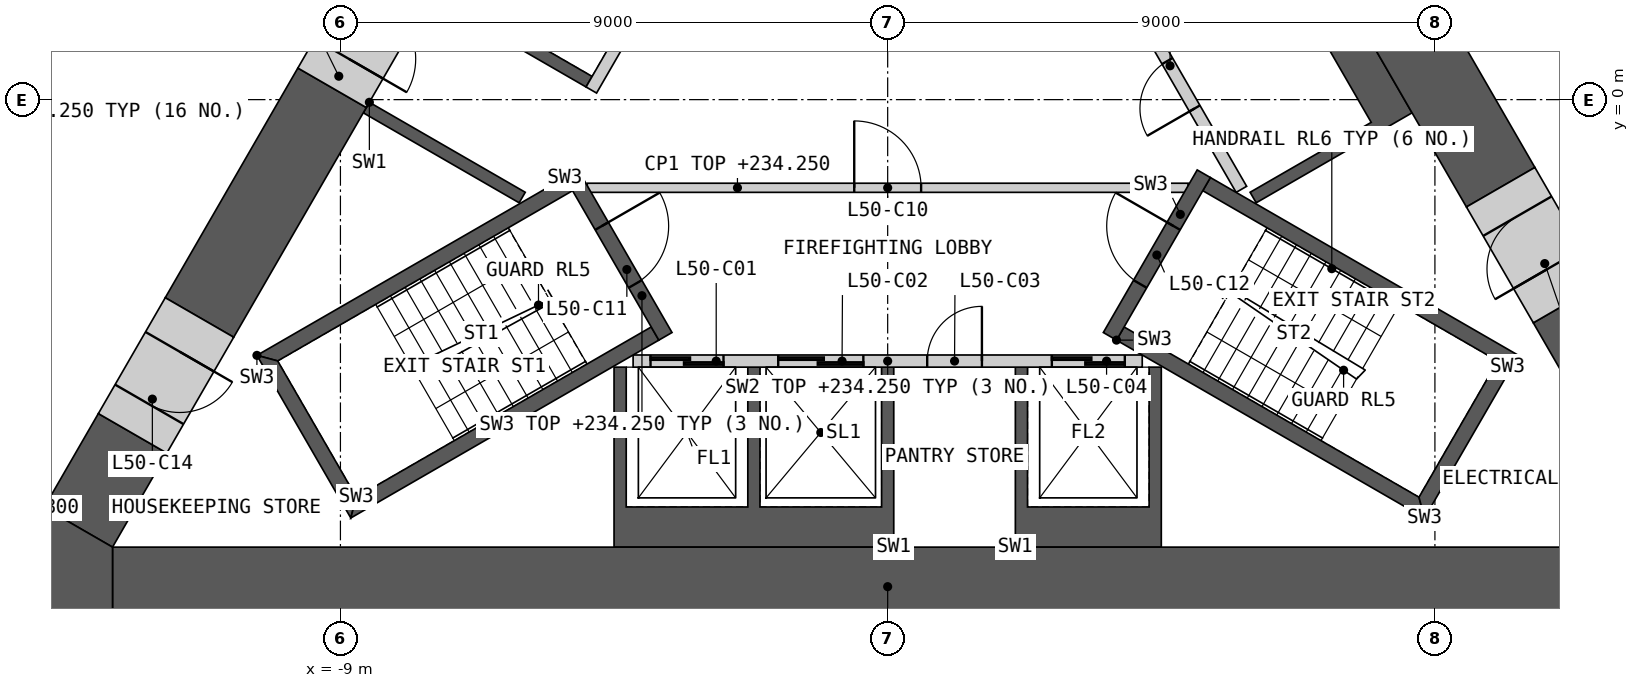
"""IFC4 building model, lengths in metres.
Left out: names, types, materials, properties, quantities, classifications, styles, units other than length and angle.
Written with IfcOpenShell. Run it as: python <this file> out.ifc"""

import sys

from ifc_helpers import new_model, si_unit, direction, frame, frame_2d, origin, place, context, subcontext, project, spatial, polyline, rectangle, outline, extrude, element, fill, save


model = new_model("IFC4")
c1 = context("Model", 3, precision=1e-05, world=origin(), true_north=direction((0.0, 1.0)))
c2 = subcontext(c1, "Body", "Model", "MODEL_VIEW")
j1 = project(units=[si_unit("LENGTHUNIT", "METRE"), si_unit("PLANEANGLEUNIT", "RADIAN")], contexts=[c1])
p1 = place(None, origin())
s1 = spatial("IfcSite", under=j1, at=p1, CompositionType="ELEMENT")
p2 = place(p1, origin())
s2 = spatial("IfcBuilding", under=s1, at=p2, CompositionType="ELEMENT")
p3 = place(p2, frame((0.0, 0.0, 231.0)))
s3 = spatial("IfcBuildingStorey", under=s2, at=p3, CompositionType="ELEMENT", Elevation=231.0)
p4 = place(p3, origin())
e1 = element("IfcWall", 1, at=p4, inside=s3, PredefinedType="SHEAR", context=c2, shape_type="SweptSolid", body=[
    extrude(outline(polyline([(0.1, -7.36), (-4.5, -7.36), (-4.5, -4.4), (-4.3, -4.4), (-4.3, -6.7), (-2.3, -6.7), (-2.3, -4.4), (-2.1, -4.4), (-2.1, -6.7), (-0.1, -6.7), (-0.1, -4.4), (0.1, -4.4), (0.1, -7.36)])), origin(), (0.0, 0.0, 1.0), 3.25),
])
p5 = place(p3, origin())
e2 = element("IfcWall", 2, at=p5, inside=s3, PredefinedType="SHEAR", context=c2, shape_type="SweptSolid", body=[
    extrude(outline(polyline([(2.1, -7.36), (2.1, -4.4), (2.3, -4.4), (2.3, -6.7), (4.3, -6.7), (4.3, -4.4), (4.5, -4.4), (4.5, -7.36), (2.1, -7.36)])), origin(), (0.0, 0.0, 1.0), 3.25),
])
p6 = place(p3, frame((-4.187, -4.3, 0.0), z_axis=(0.0, 0.0, 1.0), x_axis=(1.0, 0.0, 0.0)))
e3 = element("IfcWall", 3, at=p6, inside=s3, PredefinedType="SOLIDWALL", context=c2, shape_type="SweptSolid", body=[
    extrude(rectangle(XDim=8.373, YDim=0.2, at=frame_2d((4.187, 0.0))), origin(), (0.0, 0.0, 1.0), 3.25),
])
p7 = place(p6, frame((0.287, 0.0, 0.0)))
e4 = element("IfcOpeningElement", 4, at=p7, cuts=e3, PredefinedType="OPENING", context=c2, shape_type="SweptSolid", body=[
    extrude(rectangle(XDim=1.2, YDim=2.1, at=frame_2d((0.6, 1.05))), frame((0.0, 0.11, 0.0), z_axis=(0.0, -1.0, 0.0), x_axis=(1.0, 0.0, 0.0)), (0.0, 0.0, 1.0), 0.22),
])
p8 = place(p6, frame((2.387, 0.0, 0.0)))
e5 = element("IfcOpeningElement", 5, at=p8, cuts=e3, PredefinedType="OPENING", context=c2, shape_type="SweptSolid", body=[
    extrude(rectangle(XDim=1.4, YDim=2.1, at=frame_2d((0.7, 1.05))), frame((0.0, 0.11, 0.0), z_axis=(0.0, -1.0, 0.0), x_axis=(1.0, 0.0, 0.0)), (0.0, 0.0, 1.0), 0.22),
])
p9 = place(p6, frame((4.837, 0.0, 0.0)))
e6 = element("IfcOpeningElement", 6, at=p9, cuts=e3, PredefinedType="OPENING", context=c2, shape_type="SweptSolid", body=[
    extrude(rectangle(XDim=0.9, YDim=2.1, at=frame_2d((0.45, 1.05))), frame((0.0, 0.11, 0.0), z_axis=(0.0, -1.0, 0.0), x_axis=(1.0, 0.0, 0.0)), (0.0, 0.0, 1.0), 0.22),
])
p10 = place(p6, frame((6.887, 0.0, 0.0)))
e7 = element("IfcOpeningElement", 7, at=p10, cuts=e3, PredefinedType="OPENING", context=c2, shape_type="SweptSolid", body=[
    extrude(rectangle(XDim=1.2, YDim=2.1, at=frame_2d((0.6, 1.05))), frame((0.0, 0.11, 0.0), z_axis=(0.0, -1.0, 0.0), x_axis=(1.0, 0.0, 0.0)), (0.0, 0.0, 1.0), 0.22),
])
p11 = place(p3, origin())
e8 = element("IfcWall", 8, at=p11, inside=s3, PredefinedType="SHEAR", context=c2, shape_type="SweptSolid", body=[
    extrude(outline(polyline([(6.324, 3.767), (8.624, -0.217), (8.231, -0.444), (6.061, -1.697), (5.96, -1.524), (7.952, -0.374), (5.852, 3.263), (3.861, 2.113), (3.76, 2.287), (5.931, 3.54), (6.324, 3.767)])), origin(), (0.0, 0.0, 1.0), 3.25),
])
p12 = place(p3, frame((5.817, -1.476, 0.0), z_axis=(0.0, 0.0, 1.0), x_axis=(-0.500002616675, 0.866023893041, 0.0)))
e9 = element("IfcWall", 9, at=p12, inside=s3, PredefinedType="SOLIDWALL", context=c2, shape_type="SweptSolid", body=[
    extrude(rectangle(XDim=8.373, YDim=0.2, at=frame_2d((4.187, 0.0))), origin(), (0.0, 0.0, 1.0), 3.25),
])
p13 = place(p12, frame((1.537, 0.0, 0.0)))
e10 = element("IfcOpeningElement", 10, at=p13, cuts=e9, PredefinedType="OPENING", context=c2, shape_type="SweptSolid", body=[
    extrude(rectangle(XDim=0.9, YDim=2.1, at=frame_2d((0.45, 1.05))), frame((0.0, 0.11, 0.0), z_axis=(0.0, -1.0, 0.0), x_axis=(1.0, 0.0, 0.0)), (0.0, 0.0, 1.0), 0.22),
])
p14 = place(p12, frame((4.837, 0.0, 0.0)))
e11 = element("IfcOpeningElement", 11, at=p14, cuts=e9, PredefinedType="OPENING", context=c2, shape_type="SweptSolid", body=[
    extrude(rectangle(XDim=0.9, YDim=2.1, at=frame_2d((0.45, 1.05))), frame((0.0, 0.11, 0.0), z_axis=(0.0, -1.0, 0.0), x_axis=(1.0, 0.0, 0.0)), (0.0, 0.0, 1.0), 0.22),
])
p15 = place(p12, frame((6.937, 0.0, 0.0)))
e12 = element("IfcOpeningElement", 12, at=p15, cuts=e9, PredefinedType="OPENING", context=c2, shape_type="SweptSolid", body=[
    extrude(rectangle(XDim=1.1, YDim=2.1, at=frame_2d((0.55, 1.05))), frame((0.0, 0.11, 0.0), z_axis=(0.0, -1.0, 0.0), x_axis=(1.0, 0.0, 0.0)), (0.0, 0.0, 1.0), 0.22),
])
p16 = place(p3, origin())
e13 = element("IfcWall", 13, at=p16, inside=s3, PredefinedType="SHEAR", context=c2, shape_type="SweptSolid", body=[
    extrude(outline(polyline([(-7.524, 1.688), (-4.124, 7.577), (-3.731, 7.35), (-1.561, 6.097), (-1.66, 5.924), (-3.652, 7.074), (-4.652, 5.342), (-2.66, 4.192), (-2.76, 4.019), (-4.752, 5.169), (-5.752, 3.437), (-3.76, 2.287), (-3.861, 2.113), (-5.852, 3.263), (-6.852, 1.531), (-4.861, 0.381), (-4.96, 0.208), (-7.131, 1.461), (-7.524, 1.688)])), origin(), (0.0, 0.0, 1.0), 3.25),
])
p17 = place(p3, origin())
e14 = element("IfcWall", 14, at=p17, inside=s3, PredefinedType="SHEAR", context=c2, shape_type="SweptSolid", body=[
    extrude(outline(polyline([(-8.524, -0.044), (-8.131, -0.271), (-5.96, -1.524), (-6.061, -1.697), (-8.231, -0.444), (-8.624, -0.217), (-8.524, -0.044)])), origin(), (0.0, 0.0, 1.0), 3.25),
])
p18 = place(p3, frame((-1.631, 5.776, 0.0), z_axis=(0.0, 0.0, 1.0), x_axis=(-0.499992876559, -0.866029516466, 0.0)))
e15 = element("IfcWall", 15, at=p18, inside=s3, PredefinedType="SOLIDWALL", context=c2, shape_type="SweptSolid", body=[
    extrude(rectangle(XDim=6.486, YDim=0.2, at=frame_2d((3.243, 0.0))), origin(), (0.0, 0.0, 1.0), 3.25),
])
p19 = place(p18, frame((0.337, 0.0, 0.0)))
e16 = element("IfcOpeningElement", 16, at=p19, cuts=e15, PredefinedType="OPENING", context=c2, shape_type="SweptSolid", body=[
    extrude(rectangle(XDim=1.1, YDim=2.1, at=frame_2d((0.55, 1.05))), frame((0.0, 0.11, 0.0), z_axis=(0.0, -1.0, 0.0), x_axis=(1.0, 0.0, 0.0)), (0.0, 0.0, 1.0), 0.22),
])
p20 = place(p18, frame((2.537, 0.0, 0.0)))
e17 = element("IfcOpeningElement", 17, at=p20, cuts=e15, PredefinedType="OPENING", context=c2, shape_type="SweptSolid", body=[
    extrude(rectangle(XDim=1.1, YDim=2.1, at=frame_2d((0.55, 1.05))), frame((0.0, 0.11, 0.0), z_axis=(0.0, -1.0, 0.0), x_axis=(1.0, 0.0, 0.0)), (0.0, 0.0, 1.0), 0.22),
])
p21 = place(p3, frame((-4.941, -1.45, 0.0), z_axis=(0.0, 0.0, 1.0), x_axis=(1.0, 0.0, 0.0)))
e18 = element("IfcWall", 18, at=p21, inside=s3, PredefinedType="PARTITIONING", context=c2, shape_type="SweptSolid", body=[
    extrude(rectangle(XDim=9.882, YDim=0.15, at=frame_2d((4.941, 0.0))), origin(), (0.0, 0.0, 1.0), 3.25),
])
p22 = place(p21, frame((4.391, 0.0, 0.0)))
e19 = element("IfcOpeningElement", 19, at=p22, cuts=e18, PredefinedType="OPENING", context=c2, shape_type="SweptSolid", body=[
    extrude(rectangle(XDim=1.1, YDim=2.1, at=frame_2d((0.55, 1.05))), frame((0.0, 0.085, 0.0), z_axis=(0.0, -1.0, 0.0), x_axis=(1.0, 0.0, 0.0)), (0.0, 0.0, 1.0), 0.17),
])
p23 = place(p3, origin())
e20 = element("IfcWall", 20, at=p23, inside=s3, PredefinedType="SHEAR", context=c2, shape_type="SweptSolid", body=[
    extrude(outline(polyline([(-5.307, -1.281), (-10.374, -4.206), (-10.032, -4.298), (-5.182, -1.498), (-5.307, -1.281)])), origin(), (0.0, 0.0, 1.0), 3.25),
])
p24 = place(p3, origin())
e21 = element("IfcWall", 21, at=p24, inside=s3, PredefinedType="SHEAR", context=c2, shape_type="SweptSolid", body=[
    extrude(outline(polyline([(-10.374, -4.206), (-8.83, -6.881), (-8.738, -6.539), (-10.032, -4.298), (-10.374, -4.206)])), origin(), (0.0, 0.0, 1.0), 3.25),
])
p25 = place(p3, origin())
e22 = element("IfcWall", 22, at=p25, inside=s3, PredefinedType="SHEAR", context=c2, shape_type="SweptSolid", body=[
    extrude(outline(polyline([(-8.738, -6.539), (-8.83, -6.881), (-3.763, -3.956), (-3.888, -3.739), (-8.738, -6.539)])), origin(), (0.0, 0.0, 1.0), 3.25),
])
p26 = place(p3, frame((-5.199, -1.219, 0.0), z_axis=(0.0, 0.0, 1.0), x_axis=(0.499982516597, -0.866035497597, 0.0)))
e23 = element("IfcWall", 23, at=p26, inside=s3, PredefinedType="SHEAR", context=c2, shape_type="SweptSolid", body=[
    extrude(rectangle(XDim=3.088, YDim=0.25, at=frame_2d((1.544, 0.0))), origin(), (0.0, 0.0, 1.0), 3.25),
])
p27 = place(p26, frame((0.994, 0.0, 0.0)))
e24 = element("IfcOpeningElement", 24, at=p27, cuts=e23, PredefinedType="OPENING", context=c2, shape_type="SweptSolid", body=[
    extrude(rectangle(XDim=1.1, YDim=2.1, at=frame_2d((0.55, 1.05))), frame((0.0, 0.135, 0.0), z_axis=(0.0, -1.0, 0.0), x_axis=(1.0, 0.0, 0.0)), (0.0, 0.0, 1.0), 0.27),
])
p28 = place(p3, origin())
e25 = element("IfcWall", 25, at=p28, inside=s3, PredefinedType="SHEAR", context=c2, shape_type="SweptSolid", body=[
    extrude(outline(polyline([(3.763, -3.956), (8.83, -6.881), (8.738, -6.539), (3.888, -3.739), (3.763, -3.956)])), origin(), (0.0, 0.0, 1.0), 3.25),
])
p29 = place(p3, origin())
e26 = element("IfcWall", 26, at=p29, inside=s3, PredefinedType="SHEAR", context=c2, shape_type="SweptSolid", body=[
    extrude(outline(polyline([(8.83, -6.881), (10.374, -4.206), (10.032, -4.298), (8.738, -6.539), (8.83, -6.881)])), origin(), (0.0, 0.0, 1.0), 3.25),
])
p30 = place(p3, origin())
e27 = element("IfcWall", 27, at=p30, inside=s3, PredefinedType="SHEAR", context=c2, shape_type="SweptSolid", body=[
    extrude(outline(polyline([(10.032, -4.298), (10.374, -4.206), (5.307, -1.281), (5.182, -1.498), (10.032, -4.298)])), origin(), (0.0, 0.0, 1.0), 3.25),
])
p31 = place(p3, frame((3.655, -3.893, 0.0), z_axis=(0.0, 0.0, 1.0), x_axis=(0.499982516597, 0.866035497597, 0.0)))
e28 = element("IfcWall", 28, at=p31, inside=s3, PredefinedType="SHEAR", context=c2, shape_type="SweptSolid", body=[
    extrude(rectangle(XDim=3.088, YDim=0.25, at=frame_2d((1.544, 0.0))), origin(), (0.0, 0.0, 1.0), 3.25),
])
p32 = place(p31, frame((0.994, 0.0, 0.0)))
e29 = element("IfcOpeningElement", 29, at=p32, cuts=e28, PredefinedType="OPENING", context=c2, shape_type="SweptSolid", body=[
    extrude(rectangle(XDim=1.1, YDim=2.1, at=frame_2d((0.55, 1.05))), frame((0.0, 0.135, 0.0), z_axis=(0.0, -1.0, 0.0), x_axis=(1.0, 0.0, 0.0)), (0.0, 0.0, 1.0), 0.27),
])
p33 = place(p3, frame((-12.748, -8.01, 0.0), z_axis=(0.0, 0.0, 1.0), x_axis=(1.0, 0.0, 0.0)))
e30 = element("IfcWall", 30, at=p33, inside=s3, PredefinedType="SHEAR", context=c2, shape_type="SweptSolid", body=[
    extrude(rectangle(XDim=25.497, YDim=1.3, at=frame_2d((12.748, 0.0))), origin(), (0.0, 0.0, 1.0), 3.25),
])
p34 = place(p3, frame((10.081, -1.441, 0.0), z_axis=(0.0, 0.0, 1.0), x_axis=(-0.500012180433, 0.866018371294, 0.0)))
e31 = element("IfcWall", 31, at=p34, inside=s3, PredefinedType="SHEAR", context=c2, shape_type="SweptSolid", body=[
    extrude(rectangle(XDim=15.05, YDim=1.3, at=frame_2d((7.525, 0.0))), origin(), (0.0, 0.0, 1.0), 3.25),
])
p35 = place(p3, frame((13.311, -7.035, 0.0), z_axis=(0.0, 0.0, 1.0), x_axis=(-0.500003555838, 0.866023350811, 0.0)))
e32 = element("IfcWall", 32, at=p35, inside=s3, PredefinedType="SHEAR", context=c2, shape_type="SweptSolid", body=[
    extrude(rectangle(XDim=4.26, YDim=1.3, at=frame_2d((2.13, 0.0))), origin(), (0.0, 0.0, 1.0), 3.25),
])
p36 = place(p3, frame((-9.137, 0.195, 0.0), z_axis=(0.0, 0.0, 1.0), x_axis=(-0.499985697398, -0.866033661238, 0.0)))
e33 = element("IfcWall", 33, at=p36, inside=s3, PredefinedType="SHEAR", context=c2, shape_type="SweptSolid", body=[
    extrude(rectangle(XDim=4.362, YDim=1.3, at=frame_2d((2.181, 0.0))), origin(), (0.0, 0.0, 1.0), 3.25),
])
p37 = place(p3, frame((-12.418, -5.488, 0.0), z_axis=(0.0, 0.0, 1.0), x_axis=(-0.499931460552, -0.866064971437, 0.0)))
e34 = element("IfcWall", 34, at=p37, inside=s3, PredefinedType="SHEAR", context=c2, shape_type="SweptSolid", body=[
    extrude(rectangle(XDim=1.786, YDim=1.3, at=frame_2d((0.893, 0.0))), origin(), (0.0, 0.0, 1.0), 3.25),
])
p38 = place(p3, origin())
e35 = element("IfcWall", 35, at=p38, inside=s3, PredefinedType="SHEAR", context=c2, shape_type="SweptSolid", body=[
    extrude(outline(polyline([(-13.874, -6.71), (-12.748, -7.36), (-12.748, -8.66), (-15.0, -8.66), (-13.874, -6.71)])), origin(), (0.0, 0.0, 1.0), 3.25),
])
p39 = place(p3, frame((-11.318, -3.583, 0.0), z_axis=(0.0, 0.0, 1.0), x_axis=(-0.50002983664, -0.866008176907, 0.0)))
e36 = element("IfcWall", 36, at=p39, inside=s3, PredefinedType="SHEAR", context=c2, shape_type="SweptSolid", body=[
    extrude(rectangle(XDim=2.2, YDim=1.3, at=frame_2d((1.1, 0.0))), origin(), (0.0, 0.0, 1.0), 3.25),
])
p40 = place(p39, frame((0.65, 0.0, 0.0)))
e37 = element("IfcOpeningElement", 37, at=p40, cuts=e36, PredefinedType="OPENING", context=c2, shape_type="SweptSolid", body=[
    extrude(rectangle(XDim=1.0, YDim=2.1, at=frame_2d((0.5, 1.05))), frame((0.0, 0.66, 0.0), z_axis=(0.0, -1.0, 0.0), x_axis=(1.0, 0.0, 0.0)), (0.0, 0.0, 1.0), 1.32),
])
p41 = place(p3, frame((11.181, -3.346, 0.0), z_axis=(0.0, 0.0, 1.0), x_axis=(-0.499946605688, 0.86605622881, 0.0)))
e38 = element("IfcWall", 38, at=p41, inside=s3, PredefinedType="SHEAR", context=c2, shape_type="SweptSolid", body=[
    extrude(rectangle(XDim=2.2, YDim=1.3, at=frame_2d((1.1, 0.0))), origin(), (0.0, 0.0, 1.0), 3.25),
])
p42 = place(p41, frame((0.65, 0.0, 0.0)))
e39 = element("IfcOpeningElement", 39, at=p42, cuts=e38, PredefinedType="OPENING", context=c2, shape_type="SweptSolid", body=[
    extrude(rectangle(XDim=1.0, YDim=2.1, at=frame_2d((0.5, 1.05))), frame((0.0, 0.66, 0.0), z_axis=(0.0, -1.0, 0.0), x_axis=(1.0, 0.0, 0.0)), (0.0, 0.0, 1.0), 1.32),
])
p43 = place(p3, frame((-8.037, 2.1, 0.0), z_axis=(0.0, 0.0, 1.0), x_axis=(-0.50002983664, -0.866008176907, 0.0)))
e40 = element("IfcWall", 40, at=p43, inside=s3, PredefinedType="SHEAR", context=c2, shape_type="SweptSolid", body=[
    extrude(rectangle(XDim=2.2, YDim=1.3, at=frame_2d((1.1, 0.0))), origin(), (0.0, 0.0, 1.0), 3.25),
])
p44 = place(p43, frame((0.55, 0.0, 0.0)))
e41 = element("IfcOpeningElement", 41, at=p44, cuts=e40, PredefinedType="OPENING", context=c2, shape_type="SweptSolid", body=[
    extrude(rectangle(XDim=1.1, YDim=2.1, at=frame_2d((0.55, 1.05))), frame((0.0, 0.66, 0.0), z_axis=(0.0, -1.0, 0.0), x_axis=(1.0, 0.0, 0.0)), (0.0, 0.0, 1.0), 1.32),
])
p45 = place(p3, frame((-18.976, -4.747, 0.0), z_axis=(0.0, 0.0, 1.0), x_axis=(0.499999852422, 0.866025488988, 0.0)))
e42 = element("IfcWall", 42, at=p45, inside=s3, PredefinedType="PARTITIONING", context=c2, shape_type="SweptSolid", body=[
    extrude(rectangle(XDim=27.198, YDim=0.2, at=frame_2d((13.599, 0.0))), origin(), (0.0, 0.0, 1.0), 3.25),
])
p46 = place(p45, frame((25.346, 0.0, 0.0)))
e43 = element("IfcOpeningElement", 43, at=p46, cuts=e42, PredefinedType="OPENING", context=c2, shape_type="SweptSolid", body=[
    extrude(rectangle(XDim=1.1, YDim=2.1, at=frame_2d((0.55, 1.05))), frame((0.0, 0.11, 0.0), z_axis=(0.0, -1.0, 0.0), x_axis=(1.0, 0.0, 0.0)), (0.0, 0.0, 1.0), 0.22),
])
p47 = place(p45, frame((16.713, 0.0, 0.0)))
e44 = element("IfcOpeningElement", 44, at=p47, cuts=e42, PredefinedType="OPENING", context=c2, shape_type="SweptSolid", body=[
    extrude(rectangle(XDim=1.1, YDim=2.1, at=frame_2d((0.55, 1.05))), frame((0.0, 0.11, 0.0), z_axis=(0.0, -1.0, 0.0), x_axis=(1.0, 0.0, 0.0)), (0.0, 0.0, 1.0), 0.22),
])
p48 = place(p45, frame((0.35, 0.0, 0.0)))
e45 = element("IfcOpeningElement", 45, at=p48, cuts=e42, PredefinedType="OPENING", context=c2, shape_type="SweptSolid", body=[
    extrude(rectangle(XDim=1.1, YDim=2.1, at=frame_2d((0.55, 1.05))), frame((0.0, 0.11, 0.0), z_axis=(0.0, -1.0, 0.0), x_axis=(1.0, 0.0, 0.0)), (0.0, 0.0, 1.0), 0.22),
])
p49 = place(p3, frame((9.699, 5.321, 0.0), z_axis=(0.0, 0.0, 1.0), x_axis=(0.49998193945, -0.866035830797, 0.0)))
e46 = element("IfcWall", 46, at=p49, inside=s3, PredefinedType="PARTITIONING", context=c2, shape_type="SweptSolid", body=[
    extrude(rectangle(XDim=9.094, YDim=0.2, at=frame_2d((4.547, 0.0))), origin(), (0.0, 0.0, 1.0), 3.25),
])
p50 = place(p49, frame((5.212, 0.0, 0.0)))
e47 = element("IfcOpeningElement", 47, at=p50, cuts=e46, PredefinedType="OPENING", context=c2, shape_type="SweptSolid", body=[
    extrude(rectangle(XDim=1.0, YDim=2.1, at=frame_2d((0.5, 1.05))), frame((0.0, 0.11, 0.0), z_axis=(0.0, -1.0, 0.0), x_axis=(1.0, 0.0, 0.0)), (0.0, 0.0, 1.0), 0.22),
])
p51 = place(p49, frame((1.162, 0.0, 0.0)))
e48 = element("IfcOpeningElement", 48, at=p51, cuts=e46, PredefinedType="OPENING", context=c2, shape_type="SweptSolid", body=[
    extrude(rectangle(XDim=1.1, YDim=2.1, at=frame_2d((0.55, 1.05))), frame((0.0, 0.11, 0.0), z_axis=(0.0, -1.0, 0.0), x_axis=(1.0, 0.0, 0.0)), (0.0, 0.0, 1.0), 0.22),
])
p52 = place(p7, origin())
e49 = element("IfcDoor", 49, at=p52, inside=s3, OperationType="SLIDING_TO_LEFT", PredefinedType="DOOR", context=c2, shape_type="SweptSolid", body=[
    extrude(rectangle(XDim=1.2, YDim=2.1, at=frame_2d((0.6, 1.05))), frame((0.0, 0.025, 0.0), z_axis=(0.0, -1.0, 0.0), x_axis=(1.0, 0.0, 0.0)), (0.0, 0.0, 1.0), 0.05),
])
fill(e4, e49)
p53 = place(p8, origin())
e50 = element("IfcDoor", 50, at=p53, inside=s3, OperationType="SLIDING_TO_LEFT", PredefinedType="DOOR", context=c2, shape_type="SweptSolid", body=[
    extrude(rectangle(XDim=1.4, YDim=2.1, at=frame_2d((0.7, 1.05))), frame((0.0, 0.025, 0.0), z_axis=(0.0, -1.0, 0.0), x_axis=(1.0, 0.0, 0.0)), (0.0, 0.0, 1.0), 0.05),
])
fill(e5, e50)
p54 = place(p9, origin())
e51 = element("IfcDoor", 51, at=p54, inside=s3, OperationType="SINGLE_SWING_RIGHT", PredefinedType="DOOR", context=c2, shape_type="SweptSolid", body=[
    extrude(rectangle(XDim=0.9, YDim=2.1, at=frame_2d((0.45, 1.05))), frame((0.0, 0.025, 0.0), z_axis=(0.0, -1.0, 0.0), x_axis=(1.0, 0.0, 0.0)), (0.0, 0.0, 1.0), 0.05),
])
fill(e6, e51)
p55 = place(p10, origin())
e52 = element("IfcDoor", 52, at=p55, inside=s3, OperationType="SLIDING_TO_LEFT", PredefinedType="DOOR", context=c2, shape_type="SweptSolid", body=[
    extrude(rectangle(XDim=1.2, YDim=2.1, at=frame_2d((0.6, 1.05))), frame((0.0, 0.025, 0.0), z_axis=(0.0, -1.0, 0.0), x_axis=(1.0, 0.0, 0.0)), (0.0, 0.0, 1.0), 0.05),
])
fill(e7, e52)
p56 = place(p13, origin())
e53 = element("IfcDoor", 53, at=p56, inside=s3, OperationType="SINGLE_SWING_LEFT", PredefinedType="DOOR", context=c2, shape_type="SweptSolid", body=[
    extrude(rectangle(XDim=0.9, YDim=2.1, at=frame_2d((0.45, 1.05))), frame((0.0, 0.025, 0.0), z_axis=(0.0, -1.0, 0.0), x_axis=(1.0, 0.0, 0.0)), (0.0, 0.0, 1.0), 0.05),
])
fill(e10, e53)
p57 = place(p22, origin())
e54 = element("IfcDoor", 54, at=p57, inside=s3, OperationType="SINGLE_SWING_LEFT", PredefinedType="DOOR", context=c2, shape_type="SweptSolid", body=[
    extrude(rectangle(XDim=1.1, YDim=2.1, at=frame_2d((0.55, 1.05))), frame((0.0, 0.025, 0.0), z_axis=(0.0, -1.0, 0.0), x_axis=(1.0, 0.0, 0.0)), (0.0, 0.0, 1.0), 0.05),
])
fill(e19, e54)
p58 = place(p27, origin())
e55 = element("IfcDoor", 55, at=p58, inside=s3, OperationType="SINGLE_SWING_LEFT", PredefinedType="DOOR", context=c2, shape_type="SweptSolid", body=[
    extrude(rectangle(XDim=1.1, YDim=2.1, at=frame_2d((0.55, 1.05))), frame((0.0, 0.025, 0.0), z_axis=(0.0, -1.0, 0.0), x_axis=(1.0, 0.0, 0.0)), (0.0, 0.0, 1.0), 0.05),
])
fill(e24, e55)
p59 = place(p32, origin())
e56 = element("IfcDoor", 56, at=p59, inside=s3, OperationType="SINGLE_SWING_RIGHT", PredefinedType="DOOR", context=c2, shape_type="SweptSolid", body=[
    extrude(rectangle(XDim=1.1, YDim=2.1, at=frame_2d((0.55, 1.05))), frame((0.0, 0.025, 0.0), z_axis=(0.0, -1.0, 0.0), x_axis=(1.0, 0.0, 0.0)), (0.0, 0.0, 1.0), 0.05),
])
fill(e29, e56)
p60 = place(p40, origin())
e57 = element("IfcDoor", 57, at=p60, inside=s3, OperationType="SINGLE_SWING_LEFT", PredefinedType="DOOR", context=c2, shape_type="SweptSolid", body=[
    extrude(rectangle(XDim=1.0, YDim=2.1, at=frame_2d((0.5, 1.05))), frame((0.0, 0.405, 0.0), z_axis=(0.0, -1.0, 0.0), x_axis=(1.0, 0.0, 0.0)), (0.0, 0.0, 1.0), 0.05),
])
fill(e37, e57)
p61 = place(p42, origin())
e58 = element("IfcDoor", 58, at=p61, inside=s3, OperationType="SINGLE_SWING_LEFT", PredefinedType="DOOR", context=c2, shape_type="SweptSolid", body=[
    extrude(rectangle(XDim=1.0, YDim=2.1, at=frame_2d((0.5, 1.05))), frame((0.0, 0.405, 0.0), z_axis=(0.0, -1.0, 0.0), x_axis=(1.0, 0.0, 0.0)), (0.0, 0.0, 1.0), 0.05),
])
fill(e39, e58)
p62 = place(p44, origin())
e59 = element("IfcDoor", 59, at=p62, inside=s3, OperationType="SINGLE_SWING_RIGHT", PredefinedType="DOOR", context=c2, shape_type="SweptSolid", body=[
    extrude(rectangle(XDim=1.1, YDim=2.1, at=frame_2d((0.55, 1.05))), frame((0.0, 0.405, 0.0), z_axis=(0.0, -1.0, 0.0), x_axis=(1.0, 0.0, 0.0)), (0.0, 0.0, 1.0), 0.05),
])
fill(e41, e59)
save(model, sys.argv[1])
